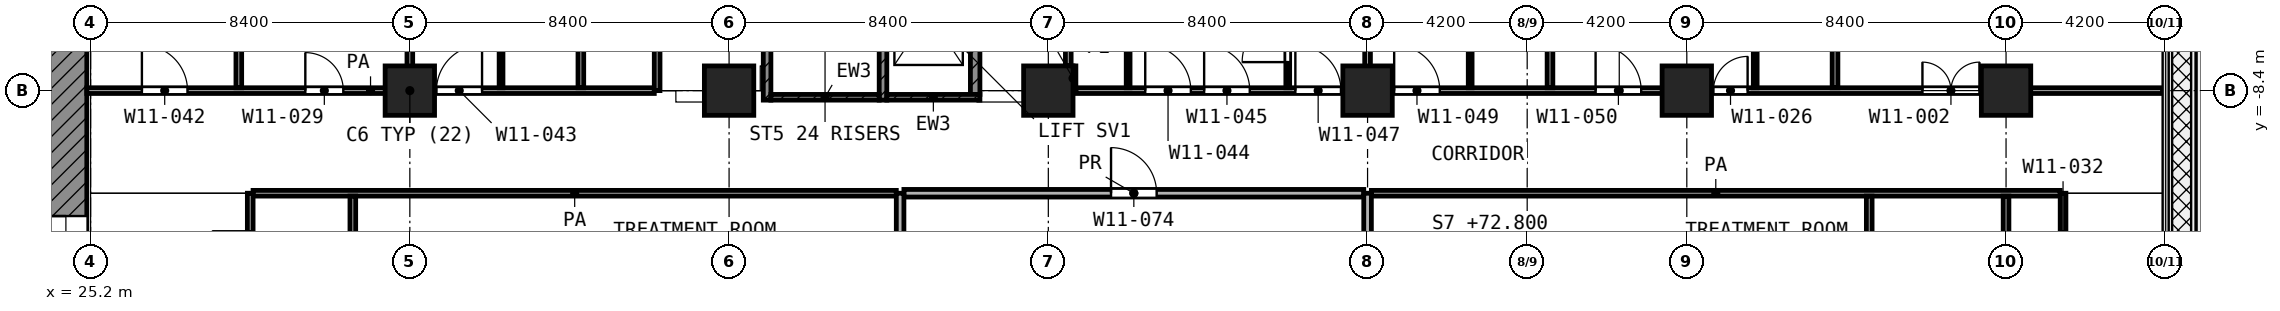
"""IFC4 building model, lengths in metres.
Left out: names, types, materials, properties, quantities, classifications, styles, units other than length and angle.
Written with IfcOpenShell. Run it as: python <this file> out.ifc"""

import sys

from ifc_helpers import new_model, si_unit, direction, frame, frame_2d, origin, origin_2d, place, context, subcontext, project, spatial, rectangle, extrude, element, fill, save


model = new_model("IFC4")
c1 = context("Model", 3, precision=1e-05, world=origin(), true_north=direction((0.0, 1.0)))
c2 = subcontext(c1, "Body", "Model", "MODEL_VIEW")
j1 = project(units=[si_unit("LENGTHUNIT", "METRE"), si_unit("PLANEANGLEUNIT", "RADIAN")], contexts=[c1])
p1 = place(None, origin())
s1 = spatial("IfcSite", under=j1, at=p1, CompositionType="ELEMENT")
p2 = place(p1, origin())
s2 = spatial("IfcBuilding", under=s1, at=p2, CompositionType="ELEMENT")
p3 = place(p2, frame((0.0, 0.0, 72.8)))
s3 = spatial("IfcBuildingStorey", under=s2, at=p3, CompositionType="ELEMENT", Elevation=72.8)
for number, where, z_axis, x_axis in (
    (1, (33.6, -8.4, 0.0), (0.0, 0.0, 1.0), (1.0, 0.0, 0.0)),
    (2, (42.0, -8.4, 0.0), (0.0, 0.0, 1.0), (1.0, 0.0, 0.0)),
    (3, (50.4, -8.4, 0.0), (0.0, 0.0, 1.0), (1.0, 0.0, 0.0)),
    (4, (58.8, -8.4, 0.0), (0.0, 0.0, 1.0), (1.0, 0.0, 0.0)),
    (5, (67.2, -8.4, 0.0), (0.0, 0.0, 1.0), (1.0, 0.0, 0.0)),
    (6, (75.6, -8.4, 0.0), (0.0, 0.0, 1.0), (1.0, 0.0, 0.0)),
):
    element("IfcColumn", number, at=place(p3, frame(where, z_axis=z_axis, x_axis=x_axis)), inside=s3, PredefinedType="COLUMN", context=c2, shape_type="SweptSolid", body=[
        extrude(rectangle(XDim=1.3, YDim=1.3, at=origin_2d()), origin(), (0.0, 0.0, 1.0), 4.2),
    ])
p4 = place(p3, frame((24.55, -24.0, 0.0), z_axis=(0.0, 0.0, 1.0), x_axis=(0.0, 1.0, 0.0)))
e7 = element("IfcWall", 7, at=p4, inside=s3, PredefinedType="SHEAR", context=c2, shape_type="SweptSolid", body=[
    extrude(rectangle(XDim=18.6, YDim=1.1, at=frame_2d((9.3, 0.0))), origin(), (0.0, 0.0, 1.0), 3.9),
])
p5 = place(p4, frame((10.5, 0.0, 0.0)))
e8 = element("IfcOpeningElement", 8, at=p5, cuts=e7, PredefinedType="OPENING", context=c2, shape_type="SweptSolid", body=[
    extrude(rectangle(XDim=1.8, YDim=2.1, at=frame_2d((0.9, 1.05))), frame((0.0, 0.56, 0.0), z_axis=(0.0, -1.0, 0.0), x_axis=(1.0, 0.0, 0.0)), (0.0, 0.0, 1.0), 1.12),
])
p6 = place(p3, frame((43.0, -8.65, 0.0), z_axis=(0.0, 0.0, 1.0), x_axis=(0.0, 1.0, 0.0)))
e9 = element("IfcWall", 9, at=p6, inside=s3, PredefinedType="SHEAR", context=c2, shape_type="SweptSolid", body=[
    extrude(rectangle(XDim=8.35, YDim=0.2, at=frame_2d((4.175, 0.0))), origin(), (0.0, 0.0, 1.0), 3.9),
])
p7 = place(p6, frame((7.0, 0.0, 0.0)))
e10 = element("IfcOpeningElement", 10, at=p7, cuts=e9, PredefinedType="OPENING", context=c2, shape_type="SweptSolid", body=[
    extrude(rectangle(XDim=1.1, YDim=2.1, at=frame_2d((0.55, 1.05))), frame((0.0, 0.11, 0.0), z_axis=(0.0, -1.0, 0.0), x_axis=(1.0, 0.0, 0.0)), (0.0, 0.0, 1.0), 0.22),
])
p8 = place(p3, frame((46.05, -8.65, 0.0), z_axis=(0.0, 0.0, 1.0), x_axis=(0.0, 1.0, 0.0)))
e11 = element("IfcWall", 11, at=p8, inside=s3, PredefinedType="SHEAR", context=c2, shape_type="SweptSolid", body=[
    extrude(rectangle(XDim=8.35, YDim=0.2, at=frame_2d((4.175, 0.0))), origin(), (0.0, 0.0, 1.0), 3.9),
])
p9 = place(p8, frame((7.0, 0.0, 0.0)))
e12 = element("IfcOpeningElement", 12, at=p9, cuts=e11, PredefinedType="OPENING", context=c2, shape_type="SweptSolid", body=[
    extrude(rectangle(XDim=1.1, YDim=2.1, at=frame_2d((0.55, 1.05))), frame((0.0, 0.11, 0.0), z_axis=(0.0, -1.0, 0.0), x_axis=(1.0, 0.0, 0.0)), (0.0, 0.0, 1.0), 0.22),
])
p10 = place(p3, frame((43.1, -8.575, 0.0), z_axis=(0.0, 0.0, 1.0), x_axis=(1.0, 0.0, 0.0)))
e13 = element("IfcWall", 13, at=p10, inside=s3, PredefinedType="SHEAR", context=c2, shape_type="SweptSolid", body=[
    extrude(rectangle(XDim=2.85, YDim=0.15, at=frame_2d((1.425, 0.0))), origin(), (0.0, 0.0, 1.0), 3.9),
])
p11 = place(p3, frame((46.15, -8.575, 0.0), z_axis=(0.0, 0.0, 1.0), x_axis=(1.0, 0.0, 0.0)))
e14 = element("IfcWall", 14, at=p11, inside=s3, PredefinedType="SHEAR", context=c2, shape_type="SweptSolid", body=[
    extrude(rectangle(XDim=2.45, YDim=0.15, at=frame_2d((1.225, 0.0))), origin(), (0.0, 0.0, 1.0), 3.9),
])
p12 = place(p3, frame((48.475, -8.5, 0.0), z_axis=(0.0, 0.0, 1.0), x_axis=(0.0, 1.0, 0.0)))
e15 = element("IfcWall", 15, at=p12, inside=s3, PredefinedType="SHEAR", context=c2, shape_type="SweptSolid", body=[
    extrude(rectangle(XDim=3.475, YDim=0.25, at=frame_2d((1.738, 0.0))), origin(), (0.0, 0.0, 1.0), 3.9),
])
for number, where, z_axis, x_axis in (
    (16, (36.0, -8.325, 0.0), (0.0, 0.0, 1.0), (0.0, 1.0, 0.0)),
    (17, (52.5, -8.325, 0.0), (0.0, 0.0, 1.0), (0.0, 1.0, 0.0)),
):
    element("IfcWall", number, at=place(p3, frame(where, z_axis=z_axis, x_axis=x_axis)), inside=s3, PredefinedType="PARTITIONING", context=c2, shape_type="SweptSolid", body=[
        extrude(rectangle(XDim=2.625, YDim=0.1, at=frame_2d((1.312, 0.0))), origin(), (0.0, 0.0, 1.0), 3.9),
    ])
p13 = place(p3, frame((56.7, -8.325, 0.0), z_axis=(0.0, 0.0, 1.0), x_axis=(0.0, 1.0, 0.0)))
e18 = element("IfcWall", 18, at=p13, inside=s3, PredefinedType="PARTITIONING", context=c2, shape_type="SweptSolid", body=[
    extrude(rectangle(XDim=2.625, YDim=0.1, at=frame_2d((1.312, 0.0))), origin(), (0.0, 0.0, 1.0), 3.9),
])
p14 = place(p13, frame((0.675, 0.0, 0.0)))
e19 = element("IfcOpeningElement", 19, at=p14, cuts=e18, PredefinedType="OPENING", context=c2, shape_type="SweptSolid", body=[
    extrude(rectangle(XDim=1.2, YDim=2.1, at=frame_2d((0.6, 1.05))), frame((0.0, 0.06, 0.0), z_axis=(0.0, -1.0, 0.0), x_axis=(1.0, 0.0, 0.0)), (0.0, 0.0, 1.0), 0.12),
])
p15 = place(p3, frame((61.5, -8.325, 0.0), z_axis=(0.0, 0.0, 1.0), x_axis=(0.0, 1.0, 0.0)))
e20 = element("IfcWall", 20, at=p15, inside=s3, PredefinedType="PARTITIONING", context=c2, shape_type="SweptSolid", body=[
    extrude(rectangle(XDim=3.225, YDim=0.1, at=frame_2d((1.612, 0.0))), origin(), (0.0, 0.0, 1.0), 3.9),
])
p16 = place(p3, frame((69.0, -8.325, 0.0), z_axis=(0.0, 0.0, 1.0), x_axis=(0.0, 1.0, 0.0)))
e21 = element("IfcWall", 21, at=p16, inside=s3, PredefinedType="PARTITIONING", context=c2, shape_type="SweptSolid", body=[
    extrude(rectangle(XDim=3.224, YDim=0.1, at=frame_2d((1.612, 0.0))), origin(), (0.0, 0.0, 1.0), 3.9),
])
p17 = place(p3, frame((29.475, -11.1, 0.0), z_axis=(0.0, 0.0, 1.0), x_axis=(1.0, 0.0, 0.0)))
e22 = element("IfcWall", 22, at=p17, inside=s3, PredefinedType="PARTITIONING", context=c2, shape_type="SweptSolid", body=[
    extrude(rectangle(XDim=16.925, YDim=0.15, at=frame_2d((8.462, 0.0))), origin(), (0.0, 0.0, 1.0), 3.9),
])
p18 = place(p3, frame((58.9, -11.1, 0.0), z_axis=(0.0, 0.0, 1.0), x_axis=(1.0, 0.0, 0.0)))
e23 = element("IfcWall", 23, at=p18, inside=s3, PredefinedType="PARTITIONING", context=c2, shape_type="SweptSolid", body=[
    extrude(rectangle(XDim=18.125, YDim=0.15, at=frame_2d((9.062, 0.0))), origin(), (0.0, 0.0, 1.0), 3.9),
])
p19 = place(p3, frame((25.1, -8.4, 0.0), z_axis=(0.0, 0.0, 1.0), x_axis=(1.0, 0.0, 0.0)))
e24 = element("IfcWall", 24, at=p19, inside=s3, PredefinedType="PARTITIONING", context=c2, shape_type="SweptSolid", body=[
    extrude(rectangle(XDim=14.932, YDim=0.15, at=frame_2d((7.466, 0.0))), origin(), (0.0, 0.0, 1.0), 3.9),
])
p20 = place(p19, frame((1.45, 0.0, 0.0)))
e25 = element("IfcOpeningElement", 25, at=p20, cuts=e24, PredefinedType="OPENING", context=c2, shape_type="SweptSolid", body=[
    extrude(rectangle(XDim=1.2, YDim=2.1, at=frame_2d((0.6, 1.05))), frame((0.0, 0.085, 0.0), z_axis=(0.0, -1.0, 0.0), x_axis=(1.0, 0.0, 0.0)), (0.0, 0.0, 1.0), 0.17),
])
p21 = place(p19, frame((5.75, 0.0, 0.0)))
e26 = element("IfcOpeningElement", 26, at=p21, cuts=e24, PredefinedType="OPENING", context=c2, shape_type="SweptSolid", body=[
    extrude(rectangle(XDim=1.0, YDim=2.1, at=frame_2d((0.5, 1.05))), frame((0.0, 0.085, 0.0), z_axis=(0.0, -1.0, 0.0), x_axis=(1.0, 0.0, 0.0)), (0.0, 0.0, 1.0), 0.17),
])
p22 = place(p19, frame((9.2, 0.0, 0.0)))
e27 = element("IfcOpeningElement", 27, at=p22, cuts=e24, PredefinedType="OPENING", context=c2, shape_type="SweptSolid", body=[
    extrude(rectangle(XDim=1.2, YDim=2.1, at=frame_2d((0.6, 1.05))), frame((0.0, 0.085, 0.0), z_axis=(0.0, -1.0, 0.0), x_axis=(1.0, 0.0, 0.0)), (0.0, 0.0, 1.0), 0.17),
])
p23 = place(p3, frame((51.125, -8.4, 0.0), z_axis=(0.0, 0.0, 1.0), x_axis=(1.0, 0.0, 0.0)))
e28 = element("IfcWall", 28, at=p23, inside=s3, PredefinedType="PARTITIONING", context=c2, shape_type="SweptSolid", body=[
    extrude(rectangle(XDim=28.595, YDim=0.15, at=frame_2d((14.297, 0.0))), origin(), (0.0, 0.0, 1.0), 3.9),
])
p24 = place(p23, frame((1.825, 0.0, 0.0)))
e29 = element("IfcOpeningElement", 29, at=p24, cuts=e28, PredefinedType="OPENING", context=c2, shape_type="SweptSolid", body=[
    extrude(rectangle(XDim=1.2, YDim=2.1, at=frame_2d((0.6, 1.05))), frame((0.0, 0.085, 0.0), z_axis=(0.0, -1.0, 0.0), x_axis=(1.0, 0.0, 0.0)), (0.0, 0.0, 1.0), 0.17),
])
p25 = place(p23, frame((3.375, 0.0, 0.0)))
e30 = element("IfcOpeningElement", 30, at=p25, cuts=e28, PredefinedType="OPENING", context=c2, shape_type="SweptSolid", body=[
    extrude(rectangle(XDim=1.2, YDim=2.1, at=frame_2d((0.6, 1.05))), frame((0.0, 0.085, 0.0), z_axis=(0.0, -1.0, 0.0), x_axis=(1.0, 0.0, 0.0)), (0.0, 0.0, 1.0), 0.17),
])
p26 = place(p23, frame((5.775, 0.0, 0.0)))
e31 = element("IfcOpeningElement", 31, at=p26, cuts=e28, PredefinedType="OPENING", context=c2, shape_type="SweptSolid", body=[
    extrude(rectangle(XDim=1.2, YDim=2.1, at=frame_2d((0.6, 1.05))), frame((0.0, 0.085, 0.0), z_axis=(0.0, -1.0, 0.0), x_axis=(1.0, 0.0, 0.0)), (0.0, 0.0, 1.0), 0.17),
])
p27 = place(p23, frame((8.375, 0.0, 0.0)))
e32 = element("IfcOpeningElement", 32, at=p27, cuts=e28, PredefinedType="OPENING", context=c2, shape_type="SweptSolid", body=[
    extrude(rectangle(XDim=1.2, YDim=2.1, at=frame_2d((0.6, 1.05))), frame((0.0, 0.085, 0.0), z_axis=(0.0, -1.0, 0.0), x_axis=(1.0, 0.0, 0.0)), (0.0, 0.0, 1.0), 0.17),
])
p28 = place(p23, frame((13.675, 0.0, 0.0)))
e33 = element("IfcOpeningElement", 33, at=p28, cuts=e28, PredefinedType="OPENING", context=c2, shape_type="SweptSolid", body=[
    extrude(rectangle(XDim=1.2, YDim=2.1, at=frame_2d((0.6, 1.05))), frame((0.0, 0.085, 0.0), z_axis=(0.0, -1.0, 0.0), x_axis=(1.0, 0.0, 0.0)), (0.0, 0.0, 1.0), 0.17),
])
p29 = place(p23, frame((16.775, 0.0, 0.0)))
e34 = element("IfcOpeningElement", 34, at=p29, cuts=e28, PredefinedType="OPENING", context=c2, shape_type="SweptSolid", body=[
    extrude(rectangle(XDim=0.9, YDim=2.1, at=frame_2d((0.45, 1.05))), frame((0.0, 0.085, 0.0), z_axis=(0.0, -1.0, 0.0), x_axis=(1.0, 0.0, 0.0)), (0.0, 0.0, 1.0), 0.17),
])
p30 = place(p23, frame((22.275, 0.0, 0.0)))
e35 = element("IfcOpeningElement", 35, at=p30, cuts=e28, PredefinedType="OPENING", context=c2, shape_type="SweptSolid", body=[
    extrude(rectangle(XDim=1.5, YDim=2.1, at=frame_2d((0.75, 1.05))), frame((0.0, 0.085, 0.0), z_axis=(0.0, -1.0, 0.0), x_axis=(1.0, 0.0, 0.0)), (0.0, 0.0, 1.0), 0.17),
])
p31 = place(p3, frame((29.1, -8.325, 0.0), z_axis=(0.0, 0.0, 1.0), x_axis=(0.0, 1.0, 0.0)))
e36 = element("IfcWall", 36, at=p31, inside=s3, PredefinedType="PARTITIONING", context=c2, shape_type="SweptSolid", body=[
    extrude(rectangle(XDim=8.245, YDim=0.15, at=frame_2d((4.123, 0.0))), origin(), (0.0, 0.0, 1.0), 3.9),
])
p32 = place(p3, frame((29.4, -14.1, 0.0), z_axis=(0.0, 0.0, 1.0), x_axis=(0.0, 1.0, 0.0)))
e37 = element("IfcWall", 37, at=p32, inside=s3, PredefinedType="PARTITIONING", context=c2, shape_type="SweptSolid", body=[
    extrude(rectangle(XDim=3.0, YDim=0.15, at=frame_2d((1.5, 0.0))), origin(), (0.0, 0.0, 1.0), 3.9),
])
p33 = place(p32, frame((1.0, 0.0, 0.0)))
e38 = element("IfcOpeningElement", 38, at=p33, cuts=e37, PredefinedType="OPENING", context=c2, shape_type="SweptSolid", body=[
    extrude(rectangle(XDim=1.0, YDim=2.1, at=frame_2d((0.5, 1.05))), frame((0.0, 0.085, 0.0), z_axis=(0.0, -1.0, 0.0), x_axis=(1.0, 0.0, 0.0)), (0.0, 0.0, 1.0), 0.17),
])
p34 = place(p3, frame((32.1, -14.025, 0.0), z_axis=(0.0, 0.0, 1.0), x_axis=(0.0, 1.0, 0.0)))
e39 = element("IfcWall", 39, at=p34, inside=s3, PredefinedType="PARTITIONING", context=c2, shape_type="SweptSolid", body=[
    extrude(rectangle(XDim=2.85, YDim=0.15, at=frame_2d((1.425, 0.0))), origin(), (0.0, 0.0, 1.0), 3.9),
])
for number, where, z_axis, x_axis in (
    (40, (33.6, -8.325, 0.0), (0.0, 0.0, 1.0), (0.0, 1.0, 0.0)),
    (41, (38.1, -8.325, 0.0), (0.0, 0.0, 1.0), (0.0, 1.0, 0.0)),
):
    element("IfcWall", number, at=place(p3, frame(where, z_axis=z_axis, x_axis=x_axis)), inside=s3, PredefinedType="PARTITIONING", context=c2, shape_type="SweptSolid", body=[
        extrude(rectangle(XDim=8.245, YDim=0.15, at=frame_2d((4.123, 0.0))), origin(), (0.0, 0.0, 1.0), 3.9),
    ])
p35 = place(p3, frame((40.107, -8.4, 0.0), z_axis=(0.0, 0.0, 1.0), x_axis=(0.0, 1.0, 0.0)))
e42 = element("IfcWall", 42, at=p35, inside=s3, PredefinedType="PARTITIONING", context=c2, shape_type="SweptSolid", body=[
    extrude(rectangle(XDim=8.048, YDim=0.15, at=frame_2d((4.024, 0.0))), origin(), (0.0, 0.0, 1.0), 3.9),
])
p36 = place(p35, frame((3.524, 0.0, 0.0)))
e43 = element("IfcOpeningElement", 43, at=p36, cuts=e42, PredefinedType="OPENING", context=c2, shape_type="SweptSolid", body=[
    extrude(rectangle(XDim=1.0, YDim=2.1, at=frame_2d((0.5, 1.05))), frame((0.0, 0.085, 0.0), z_axis=(0.0, -1.0, 0.0), x_axis=(1.0, 0.0, 0.0)), (0.0, 0.0, 1.0), 0.17),
])
p37 = place(p3, frame((50.925, -7.748, 0.0), z_axis=(0.0, 0.0, 1.0), x_axis=(0.0, 1.0, 0.0)))
e44 = element("IfcWall", 44, at=p37, inside=s3, PredefinedType="PARTITIONING", context=c2, shape_type="SweptSolid", body=[
    extrude(rectangle(XDim=5.898, YDim=0.15, at=frame_2d((2.949, 0.0))), origin(), (0.0, 0.0, 1.0), 3.9),
])
p38 = place(p37, frame((2.41, 0.0, 0.0)))
e45 = element("IfcOpeningElement", 45, at=p38, cuts=e44, PredefinedType="OPENING", context=c2, shape_type="SweptSolid", body=[
    extrude(rectangle(XDim=1.2, YDim=2.1, at=frame_2d((0.6, 1.05))), frame((0.0, 0.085, 0.0), z_axis=(0.0, -1.0, 0.0), x_axis=(1.0, 0.0, 0.0)), (0.0, 0.0, 1.0), 0.17),
])
p39 = place(p3, frame((51.05, -8.4, 0.0), z_axis=(0.0, 0.0, 1.0), x_axis=(0.0, 1.0, 0.0)))
e46 = element("IfcWall", 46, at=p39, inside=s3, PredefinedType="PARTITIONING", context=c2, shape_type="SweptSolid", body=[
    extrude(rectangle(XDim=0.65, YDim=0.15, at=frame_2d((0.325, 0.0))), origin(), (0.0, 0.0, 1.0), 3.9),
])
for number, where, z_axis, x_axis in (
    (47, (58.8, -8.325, 0.0), (0.0, 0.0, 1.0), (0.0, 1.0, 0.0)),
    (48, (63.6, -8.325, 0.0), (0.0, 0.0, 1.0), (0.0, 1.0, 0.0)),
    (49, (71.1, -8.325, 0.0), (0.0, 0.0, 1.0), (0.0, 1.0, 0.0)),
):
    element("IfcWall", number, at=place(p3, frame(where, z_axis=z_axis, x_axis=x_axis)), inside=s3, PredefinedType="PARTITIONING", context=c2, shape_type="SweptSolid", body=[
        extrude(rectangle(XDim=8.245, YDim=0.15, at=frame_2d((4.123, 0.0))), origin(), (0.0, 0.0, 1.0), 3.9),
    ])
for number, where, z_axis, x_axis in (
    (50, (72.0, -14.025, 0.0), (0.0, 0.0, 1.0), (0.0, 1.0, 0.0)),
    (51, (75.6, -14.025, 0.0), (0.0, 0.0, 1.0), (0.0, 1.0, 0.0)),
):
    element("IfcWall", number, at=place(p3, frame(where, z_axis=z_axis, x_axis=x_axis)), inside=s3, PredefinedType="PARTITIONING", context=c2, shape_type="SweptSolid", body=[
        extrude(rectangle(XDim=2.85, YDim=0.15, at=frame_2d((1.425, 0.0))), origin(), (0.0, 0.0, 1.0), 3.9),
    ])
p40 = place(p3, frame((77.1, -14.1, 0.0), z_axis=(0.0, 0.0, 1.0), x_axis=(0.0, 1.0, 0.0)))
e52 = element("IfcWall", 52, at=p40, inside=s3, PredefinedType="PARTITIONING", context=c2, shape_type="SweptSolid", body=[
    extrude(rectangle(XDim=3.0, YDim=0.15, at=frame_2d((1.5, 0.0))), origin(), (0.0, 0.0, 1.0), 3.9),
])
p41 = place(p40, frame((1.0, 0.0, 0.0)))
e53 = element("IfcOpeningElement", 53, at=p41, cuts=e52, PredefinedType="OPENING", context=c2, shape_type="SweptSolid", body=[
    extrude(rectangle(XDim=1.0, YDim=2.1, at=frame_2d((0.5, 1.05))), frame((0.0, 0.085, 0.0), z_axis=(0.0, -1.0, 0.0), x_axis=(1.0, 0.0, 0.0)), (0.0, 0.0, 1.0), 0.17),
])
p42 = place(p3, frame((46.6, -11.1, 0.0), z_axis=(0.0, 0.0, 1.0), x_axis=(1.0, 0.0, 0.0)))
e54 = element("IfcWall", 54, at=p42, inside=s3, PredefinedType="PARTITIONING", context=c2, shape_type="SweptSolid", body=[
    extrude(rectangle(XDim=12.1, YDim=0.2, at=frame_2d((6.05, 0.0))), origin(), (0.0, 0.0, 1.0), 3.9),
])
p43 = place(p42, frame((5.45, 0.0, 0.0)))
e55 = element("IfcOpeningElement", 55, at=p43, cuts=e54, PredefinedType="OPENING", context=c2, shape_type="SweptSolid", body=[
    extrude(rectangle(XDim=1.2, YDim=2.1, at=frame_2d((0.6, 1.05))), frame((0.0, 0.11, 0.0), z_axis=(0.0, -1.0, 0.0), x_axis=(1.0, 0.0, 0.0)), (0.0, 0.0, 1.0), 0.22),
])
for number, where, z_axis, x_axis in (
    (56, (46.5, -14.1, 0.0), (0.0, 0.0, 1.0), (0.0, 1.0, 0.0)),
    (57, (58.8, -14.1, 0.0), (0.0, 0.0, 1.0), (0.0, 1.0, 0.0)),
):
    element("IfcWall", number, at=place(p3, frame(where, z_axis=z_axis, x_axis=x_axis)), inside=s3, PredefinedType="PARTITIONING", context=c2, shape_type="SweptSolid", body=[
        extrude(rectangle(XDim=3.0, YDim=0.2, at=frame_2d((1.5, 0.0))), origin(), (0.0, 0.0, 1.0), 3.9),
    ])
p44 = place(p5, origin())
e58 = element("IfcDoor", 58, at=p44, inside=s3, OperationType="DOUBLE_DOOR_SINGLE_SWING", PredefinedType="DOOR", context=c2, shape_type="SweptSolid", body=[
    extrude(rectangle(XDim=1.8, YDim=2.1, at=frame_2d((0.9, 1.05))), frame((0.0, 0.025, 0.0), z_axis=(0.0, -1.0, 0.0), x_axis=(1.0, 0.0, 0.0)), (0.0, 0.0, 1.0), 0.05),
])
fill(e8, e58)
p45 = place(p20, origin())
e59 = element("IfcDoor", 59, at=p45, inside=s3, OperationType="SINGLE_SWING_LEFT", PredefinedType="DOOR", context=c2, shape_type="SweptSolid", body=[
    extrude(rectangle(XDim=1.2, YDim=2.1, at=frame_2d((0.6, 1.05))), frame((0.0, 0.025, 0.0), z_axis=(0.0, -1.0, 0.0), x_axis=(1.0, 0.0, 0.0)), (0.0, 0.0, 1.0), 0.05),
])
fill(e25, e59)
p46 = place(p21, origin())
e60 = element("IfcDoor", 60, at=p46, inside=s3, OperationType="SINGLE_SWING_LEFT", PredefinedType="DOOR", context=c2, shape_type="SweptSolid", body=[
    extrude(rectangle(XDim=1.0, YDim=2.1, at=frame_2d((0.5, 1.05))), frame((0.0, 0.025, 0.0), z_axis=(0.0, -1.0, 0.0), x_axis=(1.0, 0.0, 0.0)), (0.0, 0.0, 1.0), 0.05),
])
fill(e26, e60)
p47 = place(p22, origin())
e61 = element("IfcDoor", 61, at=p47, inside=s3, OperationType="SINGLE_SWING_RIGHT", PredefinedType="DOOR", context=c2, shape_type="SweptSolid", body=[
    extrude(rectangle(XDim=1.2, YDim=2.1, at=frame_2d((0.6, 1.05))), frame((0.0, 0.025, 0.0), z_axis=(0.0, -1.0, 0.0), x_axis=(1.0, 0.0, 0.0)), (0.0, 0.0, 1.0), 0.05),
])
fill(e27, e61)
p48 = place(p24, origin())
e62 = element("IfcDoor", 62, at=p48, inside=s3, OperationType="SINGLE_SWING_LEFT", PredefinedType="DOOR", context=c2, shape_type="SweptSolid", body=[
    extrude(rectangle(XDim=1.2, YDim=2.1, at=frame_2d((0.6, 1.05))), frame((0.0, 0.025, 0.0), z_axis=(0.0, -1.0, 0.0), x_axis=(1.0, 0.0, 0.0)), (0.0, 0.0, 1.0), 0.05),
])
fill(e29, e62)
p49 = place(p25, origin())
e63 = element("IfcDoor", 63, at=p49, inside=s3, OperationType="SINGLE_SWING_LEFT", PredefinedType="DOOR", context=c2, shape_type="SweptSolid", body=[
    extrude(rectangle(XDim=1.2, YDim=2.1, at=frame_2d((0.6, 1.05))), frame((0.0, 0.025, 0.0), z_axis=(0.0, -1.0, 0.0), x_axis=(1.0, 0.0, 0.0)), (0.0, 0.0, 1.0), 0.05),
])
fill(e30, e63)
p50 = place(p26, origin())
e64 = element("IfcDoor", 64, at=p50, inside=s3, OperationType="SINGLE_SWING_LEFT", PredefinedType="DOOR", context=c2, shape_type="SweptSolid", body=[
    extrude(rectangle(XDim=1.2, YDim=2.1, at=frame_2d((0.6, 1.05))), frame((0.0, 0.025, 0.0), z_axis=(0.0, -1.0, 0.0), x_axis=(1.0, 0.0, 0.0)), (0.0, 0.0, 1.0), 0.05),
])
fill(e31, e64)
p51 = place(p14, origin())
e65 = element("IfcDoor", 65, at=p51, inside=s3, OperationType="SINGLE_SWING_LEFT", PredefinedType="DOOR", context=c2, shape_type="SweptSolid", body=[
    extrude(rectangle(XDim=1.2, YDim=2.1, at=frame_2d((0.6, 1.05))), frame((0.0, 0.025, 0.0), z_axis=(0.0, -1.0, 0.0), x_axis=(1.0, 0.0, 0.0)), (0.0, 0.0, 1.0), 0.05),
])
fill(e19, e65)
p52 = place(p27, origin())
e66 = element("IfcDoor", 66, at=p52, inside=s3, OperationType="SINGLE_SWING_LEFT", PredefinedType="DOOR", context=c2, shape_type="SweptSolid", body=[
    extrude(rectangle(XDim=1.2, YDim=2.1, at=frame_2d((0.6, 1.05))), frame((0.0, 0.025, 0.0), z_axis=(0.0, -1.0, 0.0), x_axis=(1.0, 0.0, 0.0)), (0.0, 0.0, 1.0), 0.05),
])
fill(e32, e66)
p53 = place(p28, origin())
e67 = element("IfcDoor", 67, at=p53, inside=s3, OperationType="SINGLE_SWING_LEFT", PredefinedType="DOOR", context=c2, shape_type="SweptSolid", body=[
    extrude(rectangle(XDim=1.2, YDim=2.1, at=frame_2d((0.6, 1.05))), frame((0.0, 0.025, 0.0), z_axis=(0.0, -1.0, 0.0), x_axis=(1.0, 0.0, 0.0)), (0.0, 0.0, 1.0), 0.05),
])
fill(e33, e67)
p54 = place(p29, origin())
e68 = element("IfcDoor", 68, at=p54, inside=s3, OperationType="SINGLE_SWING_RIGHT", PredefinedType="DOOR", context=c2, shape_type="SweptSolid", body=[
    extrude(rectangle(XDim=0.9, YDim=2.1, at=frame_2d((0.45, 1.05))), frame((0.0, 0.025, 0.0), z_axis=(0.0, -1.0, 0.0), x_axis=(1.0, 0.0, 0.0)), (0.0, 0.0, 1.0), 0.05),
])
fill(e34, e68)
p55 = place(p30, origin())
e69 = element("IfcDoor", 69, at=p55, inside=s3, OperationType="DOUBLE_DOOR_SINGLE_SWING", PredefinedType="DOOR", context=c2, shape_type="SweptSolid", body=[
    extrude(rectangle(XDim=1.5, YDim=2.1, at=frame_2d((0.75, 1.05))), frame((0.0, 0.025, 0.0), z_axis=(0.0, -1.0, 0.0), x_axis=(1.0, 0.0, 0.0)), (0.0, 0.0, 1.0), 0.05),
])
fill(e35, e69)
p56 = place(p43, origin())
e70 = element("IfcDoor", 70, at=p56, inside=s3, OperationType="SINGLE_SWING_LEFT", PredefinedType="DOOR", context=c2, shape_type="SweptSolid", body=[
    extrude(rectangle(XDim=1.2, YDim=2.1, at=frame_2d((0.6, 1.05))), frame((0.0, 0.025, 0.0), z_axis=(0.0, -1.0, 0.0), x_axis=(1.0, 0.0, 0.0)), (0.0, 0.0, 1.0), 0.05),
])
fill(e55, e70)
save(model, sys.argv[1])
